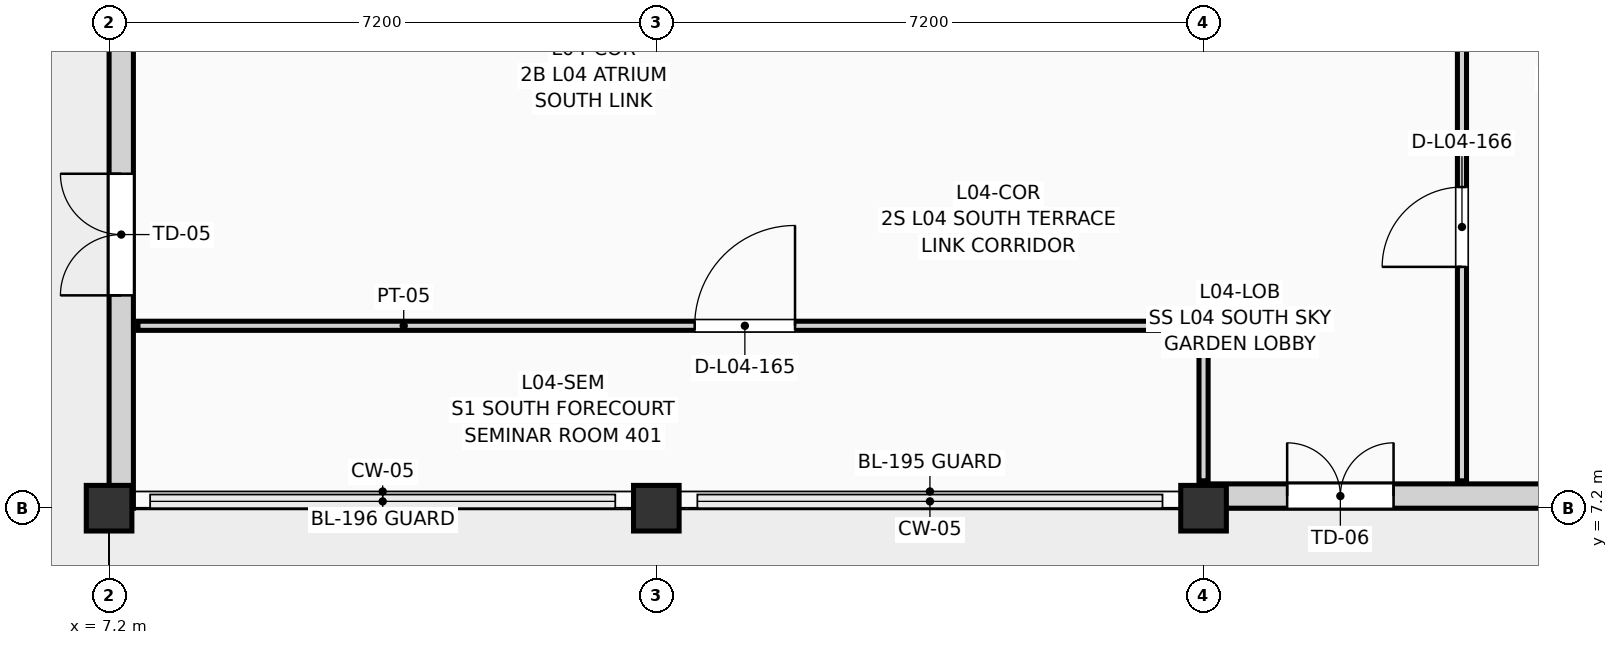
"""IFC4 building model, lengths in metres.
Left out: names, types, materials, properties, quantities, classifications, styles, units other than length and angle.
Written with IfcOpenShell. Run it as: python <this file> out.ifc"""

import sys

from ifc_helpers import new_model, si_unit, direction, frame, frame_2d, origin, origin_2d, place, context, subcontext, project, spatial, rectangle, extrude, element, fill, save


model = new_model("IFC4")
c1 = context("Model", 3, precision=1e-05, world=origin(), true_north=direction((0.0, 1.0)))
c2 = subcontext(c1, "Body", "Model", "MODEL_VIEW")
j1 = project(units=[si_unit("LENGTHUNIT", "METRE"), si_unit("PLANEANGLEUNIT", "RADIAN")], contexts=[c1])
p1 = place(None, origin())
s1 = spatial("IfcSite", under=j1, at=p1, CompositionType="ELEMENT")
p2 = place(p1, origin())
s2 = spatial("IfcBuilding", under=s1, at=p2, CompositionType="ELEMENT")
p3 = place(p2, frame((0.0, 0.0, 15.75)))
s3 = spatial("IfcBuildingStorey", under=s2, at=p3, CompositionType="ELEMENT", Elevation=15.75)
for number, where, z_axis, x_axis in (
    (1, (7.2, 7.2, 0.0), (0.0, 0.0, 1.0), (1.0, 0.0, 0.0)),
    (2, (14.4, 7.2, 0.0), (0.0, 0.0, 1.0), (1.0, 0.0, 0.0)),
    (3, (21.6, 7.2, 0.0), (0.0, 0.0, 1.0), (1.0, 0.0, 0.0)),
):
    element("IfcColumn", number, at=place(p3, frame(where, z_axis=z_axis, x_axis=x_axis)), inside=s3, PredefinedType="COLUMN", context=c2, shape_type="SweptSolid", body=[
        extrude(rectangle(XDim=0.6, YDim=0.6, at=origin_2d()), origin(), (0.0, 0.0, 1.0), 3.6),
    ])
p4 = place(p3, frame((7.36, 7.2, 0.0), z_axis=(0.0, 0.0, 1.0), x_axis=(0.0, 1.0, 0.0)))
e4 = element("IfcWall", 4, at=p4, inside=s3, PredefinedType="SOLIDWALL", context=c2, shape_type="SweptSolid", body=[
    extrude(rectangle(XDim=7.2, YDim=0.32, at=frame_2d((3.6, 0.0))), origin(), (0.0, 0.0, 1.0), 2.84),
])
p5 = place(p4, frame((2.8, 0.0, 0.0)))
e5 = element("IfcOpeningElement", 5, at=p5, cuts=e4, PredefinedType="OPENING", context=c2, shape_type="SweptSolid", body=[
    extrude(rectangle(XDim=1.6, YDim=2.25, at=frame_2d((0.8, 1.125))), frame((0.0, 0.172, 0.0), z_axis=(0.0, -1.0, 0.0), x_axis=(1.0, 0.0, 0.0)), (0.0, 0.0, 1.0), 0.344),
])
p6 = place(p3, frame((21.6, 7.36, 0.0), z_axis=(0.0, 0.0, 1.0), x_axis=(1.0, 0.0, 0.0)))
e6 = element("IfcWall", 6, at=p6, inside=s3, PredefinedType="SOLIDWALL", context=c2, shape_type="SweptSolid", body=[
    extrude(rectangle(XDim=7.2, YDim=0.32, at=frame_2d((3.6, 0.0))), origin(), (0.0, 0.0, 1.0), 2.84),
])
p7 = place(p6, frame((1.1, 0.0, 0.0)))
e7 = element("IfcOpeningElement", 7, at=p7, cuts=e6, PredefinedType="OPENING", context=c2, shape_type="SweptSolid", body=[
    extrude(rectangle(XDim=1.4, YDim=2.2, at=frame_2d((0.7, 1.1))), frame((0.0, 0.172, 0.0), z_axis=(0.0, -1.0, 0.0), x_axis=(1.0, 0.0, 0.0)), (0.0, 0.0, 1.0), 0.344),
])
p8 = place(p3, frame((21.6, 7.56, 0.0), z_axis=(0.0, 0.0, 1.0), x_axis=(0.0, 1.0, 0.0)))
e8 = element("IfcWall", 8, at=p8, inside=s3, PredefinedType="PARTITIONING", context=c2, shape_type="SweptSolid", body=[
    extrude(rectangle(XDim=1.96, YDim=0.12, at=frame_2d((0.98, 0.0))), origin(), (0.0, 0.0, 1.0), 2.655),
])
p9 = place(p3, frame((7.58, 9.6, 0.0), z_axis=(0.0, 0.0, 1.0), x_axis=(1.0, 0.0, 0.0)))
e9 = element("IfcWall", 9, at=p9, inside=s3, PredefinedType="PARTITIONING", context=c2, shape_type="SweptSolid", body=[
    extrude(rectangle(XDim=13.94, YDim=0.12, at=frame_2d((6.97, 0.0))), origin(), (0.0, 0.0, 1.0), 3.375),
])
p10 = place(p9, frame((7.325, 0.0, 0.0)))
e10 = element("IfcOpeningElement", 10, at=p10, cuts=e9, PredefinedType="OPENING", context=c2, shape_type="SweptSolid", body=[
    extrude(rectangle(XDim=1.32, YDim=2.2, at=frame_2d((0.66, 1.1))), frame((0.0, 0.072, 0.0), z_axis=(0.0, -1.0, 0.0), x_axis=(1.0, 0.0, 0.0)), (0.0, 0.0, 1.0), 0.144),
])
p11 = place(p3, frame((25.0, 7.56, 0.0), z_axis=(0.0, 0.0, 1.0), x_axis=(0.0, 1.0, 0.0)))
e11 = element("IfcWall", 11, at=p11, inside=s3, PredefinedType="PARTITIONING", context=c2, shape_type="SweptSolid", body=[
    extrude(rectangle(XDim=6.76, YDim=0.12, at=frame_2d((3.38, 0.0))), origin(), (0.0, 0.0, 1.0), 3.375),
])
p12 = place(p11, frame((2.815, 0.0, 0.0)))
e12 = element("IfcOpeningElement", 12, at=p12, cuts=e11, PredefinedType="OPENING", context=c2, shape_type="SweptSolid", body=[
    extrude(rectangle(XDim=1.05, YDim=2.18, at=frame_2d((0.525, 1.09))), frame((0.0, 0.072, 0.0), z_axis=(0.0, -1.0, 0.0), x_axis=(1.0, 0.0, 0.0)), (0.0, 0.0, 1.0), 0.144),
])
p13 = place(p5, origin())
e13 = element("IfcDoor", 13, at=p13, inside=s3, OperationType="DOUBLE_DOOR_SINGLE_SWING", PredefinedType="DOOR", context=c2, shape_type="SweptSolid", body=[
    extrude(rectangle(XDim=1.6, YDim=2.25, at=frame_2d((0.8, 1.125))), frame((0.0, 0.025, 0.0), z_axis=(0.0, -1.0, 0.0), x_axis=(1.0, 0.0, 0.0)), (0.0, 0.0, 1.0), 0.05),
])
fill(e5, e13)
p14 = place(p7, origin())
e14 = element("IfcDoor", 14, at=p14, inside=s3, OperationType="DOUBLE_DOOR_SINGLE_SWING", PredefinedType="DOOR", context=c2, shape_type="SweptSolid", body=[
    extrude(rectangle(XDim=1.4, YDim=2.2, at=frame_2d((0.7, 1.1))), frame((0.0, 0.025, 0.0), z_axis=(0.0, -1.0, 0.0), x_axis=(1.0, 0.0, 0.0)), (0.0, 0.0, 1.0), 0.05),
])
fill(e7, e14)
p15 = place(p10, origin())
e15 = element("IfcDoor", 15, at=p15, inside=s3, OperationType="SINGLE_SWING_RIGHT", PredefinedType="DOOR", context=c2, shape_type="SweptSolid", body=[
    extrude(rectangle(XDim=1.32, YDim=2.2, at=frame_2d((0.66, 1.1))), frame((0.0, 0.025, 0.0), z_axis=(0.0, -1.0, 0.0), x_axis=(1.0, 0.0, 0.0)), (0.0, 0.0, 1.0), 0.05),
])
fill(e10, e15)
p16 = place(p12, origin())
e16 = element("IfcDoor", 16, at=p16, inside=s3, OperationType="SINGLE_SWING_LEFT", PredefinedType="DOOR", context=c2, shape_type="SweptSolid", body=[
    extrude(rectangle(XDim=1.05, YDim=2.18, at=frame_2d((0.525, 1.09))), frame((0.0, 0.025, 0.0), z_axis=(0.0, -1.0, 0.0), x_axis=(1.0, 0.0, 0.0)), (0.0, 0.0, 1.0), 0.05),
])
fill(e12, e16)
save(model, sys.argv[1])
